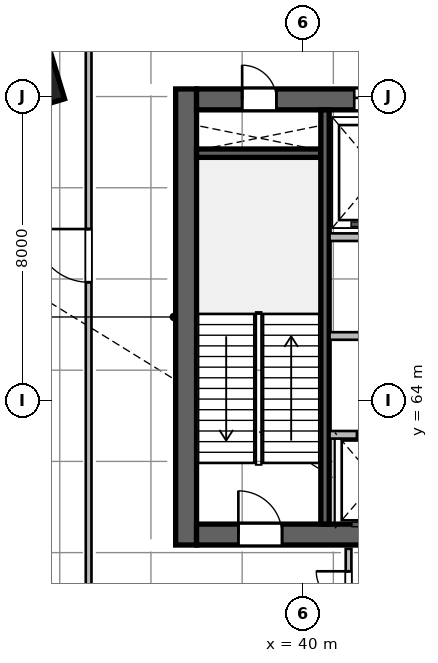
"""IFC4 building model, lengths in metres.
Left out: names, types, materials, properties, quantities, classifications, styles, units other than length and angle.
Written with IfcOpenShell. Run it as: python <this file> out.ifc"""

import sys

from ifc_helpers import new_model, si_unit, direction, frame, frame_2d, origin, origin_2d, place, context, subcontext, project, spatial, rectangle, extrude, source, transform, mapped, element, fill, save


model = new_model("IFC4")
c1 = context("Model", 3, precision=1e-05, world=origin(), true_north=direction((0.0, 1.0)))
c2 = subcontext(c1, "Body", "Model", "MODEL_VIEW")
j1 = project(units=[si_unit("LENGTHUNIT", "METRE"), si_unit("PLANEANGLEUNIT", "RADIAN")], contexts=[c1])
p1 = place(None, origin())
s1 = spatial("IfcSite", under=j1, at=p1, CompositionType="ELEMENT")
p2 = place(p1, origin())
s2 = spatial("IfcBuilding", under=s1, at=p2, CompositionType="ELEMENT")
p3 = place(p2, frame((0.0, 0.0, 30.0)))
s3 = spatial("IfcBuildingStorey", under=s2, at=p3, CompositionType="ELEMENT", Elevation=30.0)
m1 = source(origin(), c2, "Body", "SweptSolid", [
    extrude(rectangle(XDim=12.0, YDim=0.55, at=frame_2d((6.0, 0.0))), origin(), (0.0, 0.0, 1.0), 5.4),
])
p4 = place(p3, frame((36.925, 60.2, 0.0), z_axis=(0.0, 0.0, 1.0), x_axis=(0.0, 1.0, 0.0)))
e1 = element("IfcWall", 1, at=p4, inside=s3, PredefinedType="SHEAR", context=c2, shape_type="MappedRepresentation", body=[
    mapped(m1, transform((0.0, 0.0, 0.0), scale=1.0)),
])
m2 = source(origin(), c2, "Body", "SweptSolid", [
    extrude(rectangle(XDim=21.6, YDim=0.55, at=frame_2d((10.8, 0.0))), origin(), (0.0, 0.0, 1.0), 5.4),
])
p5 = place(p3, frame((37.2, 60.475, 0.0), z_axis=(0.0, 0.0, 1.0), x_axis=(1.0, 0.0, 0.0)))
e2 = element("IfcWall", 2, at=p5, inside=s3, PredefinedType="SHEAR", context=c2, shape_type="MappedRepresentation", body=[
    mapped(m2, transform((0.0, 0.0, 0.0), scale=1.0)),
])
p6 = place(p5, frame((1.1, 0.0, 0.0)))
e3 = element("IfcOpeningElement", 3, at=p6, cuts=e2, PredefinedType="OPENING", context=c2, shape_type="SweptSolid", body=[
    extrude(rectangle(XDim=1.15, YDim=2.15, at=frame_2d((0.575, 1.075))), frame((0.0, 0.285, 0.0), z_axis=(0.0, -1.0, 0.0), x_axis=(1.0, 0.0, 0.0)), (0.0, 0.0, 1.0), 0.57),
])
p7 = place(p5, frame((19.5, 0.0, 0.0)))
e4 = element("IfcOpeningElement", 4, at=p7, cuts=e2, PredefinedType="OPENING", context=c2, shape_type="SweptSolid", body=[
    extrude(rectangle(XDim=0.9, YDim=2.1, at=frame_2d((0.45, 1.05))), frame((0.0, 0.285, 0.0), z_axis=(0.0, -1.0, 0.0), x_axis=(1.0, 0.0, 0.0)), (0.0, 0.0, 1.0), 0.57),
])
p8 = place(p5, frame((12.02, 0.0, 0.0)))
e5 = element("IfcOpeningElement", 5, at=p8, cuts=e2, PredefinedType="OPENING", context=c2, shape_type="SweptSolid", body=[
    extrude(rectangle(XDim=1.6, YDim=2.15, at=frame_2d((0.8, 1.075))), frame((0.0, 0.285, 0.0), z_axis=(0.0, -1.0, 0.0), x_axis=(1.0, 0.0, 0.0)), (0.0, 0.0, 1.0), 0.57),
])
p9 = place(p3, frame((37.2, 71.925, 0.0), z_axis=(0.0, 0.0, 1.0), x_axis=(1.0, 0.0, 0.0)))
e6 = element("IfcWall", 6, at=p9, inside=s3, PredefinedType="SHEAR", context=c2, shape_type="MappedRepresentation", body=[
    mapped(m2, transform((0.0, 0.0, 0.0), scale=1.0)),
])
p10 = place(p9, frame((1.2, 0.0, 0.0)))
e7 = element("IfcOpeningElement", 7, at=p10, cuts=e6, PredefinedType="OPENING", context=c2, shape_type="SweptSolid", body=[
    extrude(rectangle(XDim=0.9, YDim=2.1, at=frame_2d((0.45, 1.05))), frame((0.0, 0.285, 0.0), z_axis=(0.0, -1.0, 0.0), x_axis=(1.0, 0.0, 0.0)), (0.0, 0.0, 1.0), 0.57),
])
p11 = place(p9, frame((14.7, 0.0, 0.0)))
e8 = element("IfcOpeningElement", 8, at=p11, cuts=e6, PredefinedType="OPENING", context=c2, shape_type="SweptSolid", body=[
    extrude(rectangle(XDim=1.2, YDim=2.15, at=frame_2d((0.6, 1.075))), frame((0.0, 0.285, 0.0), z_axis=(0.0, -1.0, 0.0), x_axis=(1.0, 0.0, 0.0)), (0.0, 0.0, 1.0), 0.57),
])
p12 = place(p9, frame((4.15, 0.0, 0.0)))
e9 = element("IfcOpeningElement", 9, at=p12, cuts=e6, PredefinedType="OPENING", context=c2, shape_type="SweptSolid", body=[
    extrude(rectangle(XDim=1.3, YDim=2.15, at=frame_2d((0.65, 1.075))), frame((0.0, 0.285, 0.0), z_axis=(0.0, -1.0, 0.0), x_axis=(1.0, 0.0, 0.0)), (0.0, 0.0, 1.0), 0.57),
])
p13 = place(p9, frame((7.25, 0.0, 0.0)))
e10 = element("IfcOpeningElement", 10, at=p13, cuts=e6, PredefinedType="OPENING", context=c2, shape_type="SweptSolid", body=[
    extrude(rectangle(XDim=0.9, YDim=2.1, at=frame_2d((0.45, 1.05))), frame((0.0, 0.285, 0.0), z_axis=(0.0, -1.0, 0.0), x_axis=(1.0, 0.0, 0.0)), (0.0, 0.0, 1.0), 0.57),
])
m3 = source(origin(), c2, "Body", "SweptSolid", [
    extrude(rectangle(XDim=3.27, YDim=0.22, at=frame_2d((1.635, 0.0))), origin(), (0.0, 0.0, 1.0), 5.4),
])
p14 = place(p3, frame((37.2, 70.51, 0.0), z_axis=(0.0, 0.0, 1.0), x_axis=(1.0, 0.0, 0.0)))
e11 = element("IfcWall", 11, at=p14, inside=s3, PredefinedType="SHEAR", context=c2, shape_type="MappedRepresentation", body=[
    mapped(m3, transform((0.0, 0.0, 0.0), scale=1.0)),
])
m4 = source(origin(), c2, "Body", "SweptSolid", [
    extrude(rectangle(XDim=10.9, YDim=0.22, at=frame_2d((5.45, 0.0))), origin(), (0.0, 0.0, 1.0), 5.4),
])
p15 = place(p3, frame((40.58, 60.75, 0.0), z_axis=(0.0, 0.0, 1.0), x_axis=(0.0, 1.0, 0.0)))
e12 = element("IfcWall", 12, at=p15, inside=s3, PredefinedType="SHEAR", context=c2, shape_type="MappedRepresentation", body=[
    mapped(m4, transform((0.0, 0.0, 0.0), scale=1.0)),
])
m5 = source(origin(), c2, "Body", "SweptSolid", [
    extrude(rectangle(XDim=1.5, YDim=1.5, at=origin_2d()), origin(), (0.0, 0.0, 1.0), 5.4),
])
p16 = place(p3, frame((32.791, 72.442, 0.0), z_axis=(0.0, 0.0, 1.0), x_axis=(-0.288697611798, 0.957420330337, 0.0)))
e13 = element("IfcColumn", 13, at=p16, inside=s3, PredefinedType="COLUMN", context=c2, shape_type="MappedRepresentation", body=[
    mapped(m5, transform((0.0, 0.0, 0.0), scale=1.0)),
])
m6 = source(origin(), c2, "Body", "SweptSolid", [
    extrude(rectangle(XDim=8.8, YDim=0.2, at=frame_2d((4.4, 0.0))), origin(), (0.0, 0.0, 1.0), 5.16),
])
p17 = place(p3, frame((40.7, 68.3, 0.0), z_axis=(0.0, 0.0, 1.0), x_axis=(1.0, 0.0, 0.0)))
e14 = element("IfcWall", 14, at=p17, inside=s3, PredefinedType="SOLIDWALL", context=c2, shape_type="MappedRepresentation", body=[
    mapped(m6, transform((0.0, 0.0, 0.0), scale=1.0)),
])
m7 = source(origin(), c2, "Body", "SweptSolid", [
    extrude(rectangle(XDim=8.02, YDim=0.2, at=frame_2d((4.01, 0.0))), origin(), (0.0, 0.0, 1.0), 5.16),
])
p18 = place(p3, frame((40.7, 63.1, 0.0), z_axis=(0.0, 0.0, 1.0), x_axis=(1.0, 0.0, 0.0)))
e15 = element("IfcWall", 15, at=p18, inside=s3, PredefinedType="SOLIDWALL", context=c2, shape_type="MappedRepresentation", body=[
    mapped(m7, transform((0.0, 0.0, 0.0), scale=1.0)),
])
p19 = place(p18, frame((0.72, 0.0, 0.0)))
e16 = element("IfcOpeningElement", 16, at=p19, cuts=e15, PredefinedType="OPENING", context=c2, shape_type="SweptSolid", body=[
    extrude(rectangle(XDim=1.0, YDim=2.15, at=frame_2d((0.5, 1.075))), frame((0.0, 0.11, 0.0), z_axis=(0.0, -1.0, 0.0), x_axis=(1.0, 0.0, 0.0)), (0.0, 0.0, 1.0), 0.22),
])
p20 = place(p18, frame((2.62, 0.0, 0.0)))
e17 = element("IfcOpeningElement", 17, at=p20, cuts=e15, PredefinedType="OPENING", context=c2, shape_type="SweptSolid", body=[
    extrude(rectangle(XDim=1.0, YDim=2.15, at=frame_2d((0.5, 1.075))), frame((0.0, 0.11, 0.0), z_axis=(0.0, -1.0, 0.0), x_axis=(1.0, 0.0, 0.0)), (0.0, 0.0, 1.0), 0.22),
])
p21 = place(p18, frame((4.55, 0.0, 0.0)))
e18 = element("IfcOpeningElement", 18, at=p21, cuts=e15, PredefinedType="OPENING", context=c2, shape_type="SweptSolid", body=[
    extrude(rectangle(XDim=1.0, YDim=2.15, at=frame_2d((0.5, 1.075))), frame((0.0, 0.11, 0.0), z_axis=(0.0, -1.0, 0.0), x_axis=(1.0, 0.0, 0.0)), (0.0, 0.0, 1.0), 0.22),
])
p22 = place(p18, frame((6.55, 0.0, 0.0)))
e19 = element("IfcOpeningElement", 19, at=p22, cuts=e15, PredefinedType="OPENING", context=c2, shape_type="SweptSolid", body=[
    extrude(rectangle(XDim=1.0, YDim=2.15, at=frame_2d((0.5, 1.075))), frame((0.0, 0.11, 0.0), z_axis=(0.0, -1.0, 0.0), x_axis=(1.0, 0.0, 0.0)), (0.0, 0.0, 1.0), 0.22),
])
p23 = place(p3, frame((40.7, 65.7, 0.0), z_axis=(0.0, 0.0, 1.0), x_axis=(1.0, 0.0, 0.0)))
e20 = element("IfcWall", 20, at=p23, inside=s3, PredefinedType="SOLIDWALL", context=c2, shape_type="MappedRepresentation", body=[
    mapped(m6, transform((0.0, 0.0, 0.0), scale=1.0)),
])
p24 = place(p23, frame((1.6, 0.0, 0.0)))
e21 = element("IfcOpeningElement", 21, at=p24, cuts=e20, PredefinedType="OPENING", context=c2, shape_type="SweptSolid", body=[
    extrude(rectangle(XDim=0.9, YDim=2.1, at=frame_2d((0.45, 1.05))), frame((0.0, 0.11, 0.0), z_axis=(0.0, -1.0, 0.0), x_axis=(1.0, 0.0, 0.0)), (0.0, 0.0, 1.0), 0.22),
])
p25 = place(p23, frame((6.1, 0.0, 0.0)))
e22 = element("IfcOpeningElement", 22, at=p25, cuts=e20, PredefinedType="OPENING", context=c2, shape_type="SweptSolid", body=[
    extrude(rectangle(XDim=0.9, YDim=2.1, at=frame_2d((0.45, 1.05))), frame((0.0, 0.11, 0.0), z_axis=(0.0, -1.0, 0.0), x_axis=(1.0, 0.0, 0.0)), (0.0, 0.0, 1.0), 0.22),
])
m8 = source(origin(), c2, "Body", "SweptSolid", [
    extrude(rectangle(XDim=2.033, YDim=0.15, at=frame_2d((1.016, 0.0))), origin(), (0.0, 0.0, 1.0), 5.16),
])
p26 = place(p3, frame((41.2, 58.067, 0.0), z_axis=(0.0, 0.0, 1.0), x_axis=(0.0, 1.0, 0.0)))
e23 = element("IfcWall", 23, at=p26, inside=s3, PredefinedType="PARTITIONING", context=c2, shape_type="MappedRepresentation", body=[
    mapped(m8, transform((0.0, 0.0, 0.0), scale=1.0)),
])
p27 = place(p26, frame((0.591, 0.0, 0.0)))
e24 = element("IfcOpeningElement", 24, at=p27, cuts=e23, PredefinedType="OPENING", context=c2, shape_type="SweptSolid", body=[
    extrude(rectangle(XDim=0.85, YDim=2.1, at=frame_2d((0.425, 1.05))), frame((0.0, 0.085, 0.0), z_axis=(0.0, -1.0, 0.0), x_axis=(1.0, 0.0, 0.0)), (0.0, 0.0, 1.0), 0.17),
])
m9 = source(origin(), c2, "Body", "SweptSolid", [
    extrude(rectangle(XDim=19.708, YDim=0.15, at=frame_2d((9.854, 0.0))), origin(), (0.0, 0.0, 1.0), 5.16),
])
p28 = place(p3, frame((34.36, 57.96, 0.0), z_axis=(0.0, 0.0, 1.0), x_axis=(0.0, 1.0, 0.0)))
e25 = element("IfcWall", 25, at=p28, inside=s3, PredefinedType="PARTITIONING", context=c2, shape_type="MappedRepresentation", body=[
    mapped(m9, transform((0.0, 0.0, 0.0), scale=1.0)),
])
p29 = place(p28, frame((9.154, 0.0, 0.0)))
e26 = element("IfcOpeningElement", 26, at=p29, cuts=e25, PredefinedType="OPENING", context=c2, shape_type="SweptSolid", body=[
    extrude(rectangle(XDim=1.4, YDim=2.15, at=frame_2d((0.7, 1.075))), frame((0.0, 0.085, 0.0), z_axis=(0.0, -1.0, 0.0), x_axis=(1.0, 0.0, 0.0)), (0.0, 0.0, 1.0), 0.17),
])
m10 = source(origin(), c2, "Body", "SweptSolid", [
    extrude(rectangle(XDim=1.15, YDim=2.15, at=frame_2d((0.575, 1.075))), frame((0.0, 0.025, 0.0), z_axis=(0.0, -1.0, 0.0), x_axis=(1.0, 0.0, 0.0)), (0.0, 0.0, 1.0), 0.05),
])
p30 = place(p6, origin())
e27 = element("IfcDoor", 27, at=p30, inside=s3, OperationType="SINGLE_SWING_LEFT", PredefinedType="DOOR", context=c2, shape_type="MappedRepresentation", body=[
    mapped(m10, transform((0.0, 0.0, 0.0), scale=1.0)),
])
fill(e3, e27)
m11 = source(origin(), c2, "Body", "SweptSolid", [
    extrude(rectangle(XDim=0.9, YDim=2.1, at=frame_2d((0.45, 1.05))), frame((0.0, 0.025, 0.0), z_axis=(0.0, -1.0, 0.0), x_axis=(1.0, 0.0, 0.0)), (0.0, 0.0, 1.0), 0.05),
])
p31 = place(p10, origin())
e28 = element("IfcDoor", 28, at=p31, inside=s3, OperationType="SINGLE_SWING_LEFT", PredefinedType="DOOR", context=c2, shape_type="MappedRepresentation", body=[
    mapped(m11, transform((0.0, 0.0, 0.0), scale=1.0)),
])
fill(e7, e28)
m12 = source(origin(), c2, "Body", "SweptSolid", [
    extrude(rectangle(XDim=1.3, YDim=2.15, at=frame_2d((0.65, 1.075))), frame((0.0, 0.025, 0.0), z_axis=(0.0, -1.0, 0.0), x_axis=(1.0, 0.0, 0.0)), (0.0, 0.0, 1.0), 0.05),
])
p32 = place(p12, origin())
e29 = element("IfcDoor", 29, at=p32, inside=s3, OperationType="DOUBLE_DOOR_SLIDING", PredefinedType="DOOR", context=c2, shape_type="MappedRepresentation", body=[
    mapped(m12, transform((0.0, 0.0, 0.0), scale=1.0)),
])
fill(e9, e29)
m13 = source(origin(), c2, "Body", "SweptSolid", [
    extrude(rectangle(XDim=1.0, YDim=2.15, at=frame_2d((0.5, 1.075))), frame((0.0, 0.025, 0.0), z_axis=(0.0, -1.0, 0.0), x_axis=(1.0, 0.0, 0.0)), (0.0, 0.0, 1.0), 0.05),
])
p33 = place(p19, origin())
e30 = element("IfcDoor", 30, at=p33, inside=s3, OperationType="DOUBLE_DOOR_SLIDING", PredefinedType="DOOR", context=c2, shape_type="MappedRepresentation", body=[
    mapped(m13, transform((0.0, 0.0, 0.0), scale=1.0)),
])
fill(e16, e30)
m14 = source(origin(), c2, "Body", "SweptSolid", [
    extrude(rectangle(XDim=0.85, YDim=2.1, at=frame_2d((0.425, 1.05))), frame((0.0, 0.025, 0.0), z_axis=(0.0, -1.0, 0.0), x_axis=(1.0, 0.0, 0.0)), (0.0, 0.0, 1.0), 0.05),
])
p34 = place(p27, origin())
e31 = element("IfcDoor", 31, at=p34, inside=s3, OperationType="SINGLE_SWING_RIGHT", PredefinedType="DOOR", context=c2, shape_type="MappedRepresentation", body=[
    mapped(m14, transform((0.0, 0.0, 0.0), scale=1.0)),
])
fill(e24, e31)
m15 = source(origin(), c2, "Body", "SweptSolid", [
    extrude(rectangle(XDim=1.4, YDim=2.15, at=frame_2d((0.7, 1.075))), frame((0.0, 0.025, 0.0), z_axis=(0.0, -1.0, 0.0), x_axis=(1.0, 0.0, 0.0)), (0.0, 0.0, 1.0), 0.05),
])
p35 = place(p29, origin())
e32 = element("IfcDoor", 32, at=p35, inside=s3, OperationType="SINGLE_SWING_RIGHT", PredefinedType="DOOR", context=c2, shape_type="MappedRepresentation", body=[
    mapped(m15, transform((0.0, 0.0, 0.0), scale=1.0)),
])
fill(e26, e32)
save(model, sys.argv[1])
